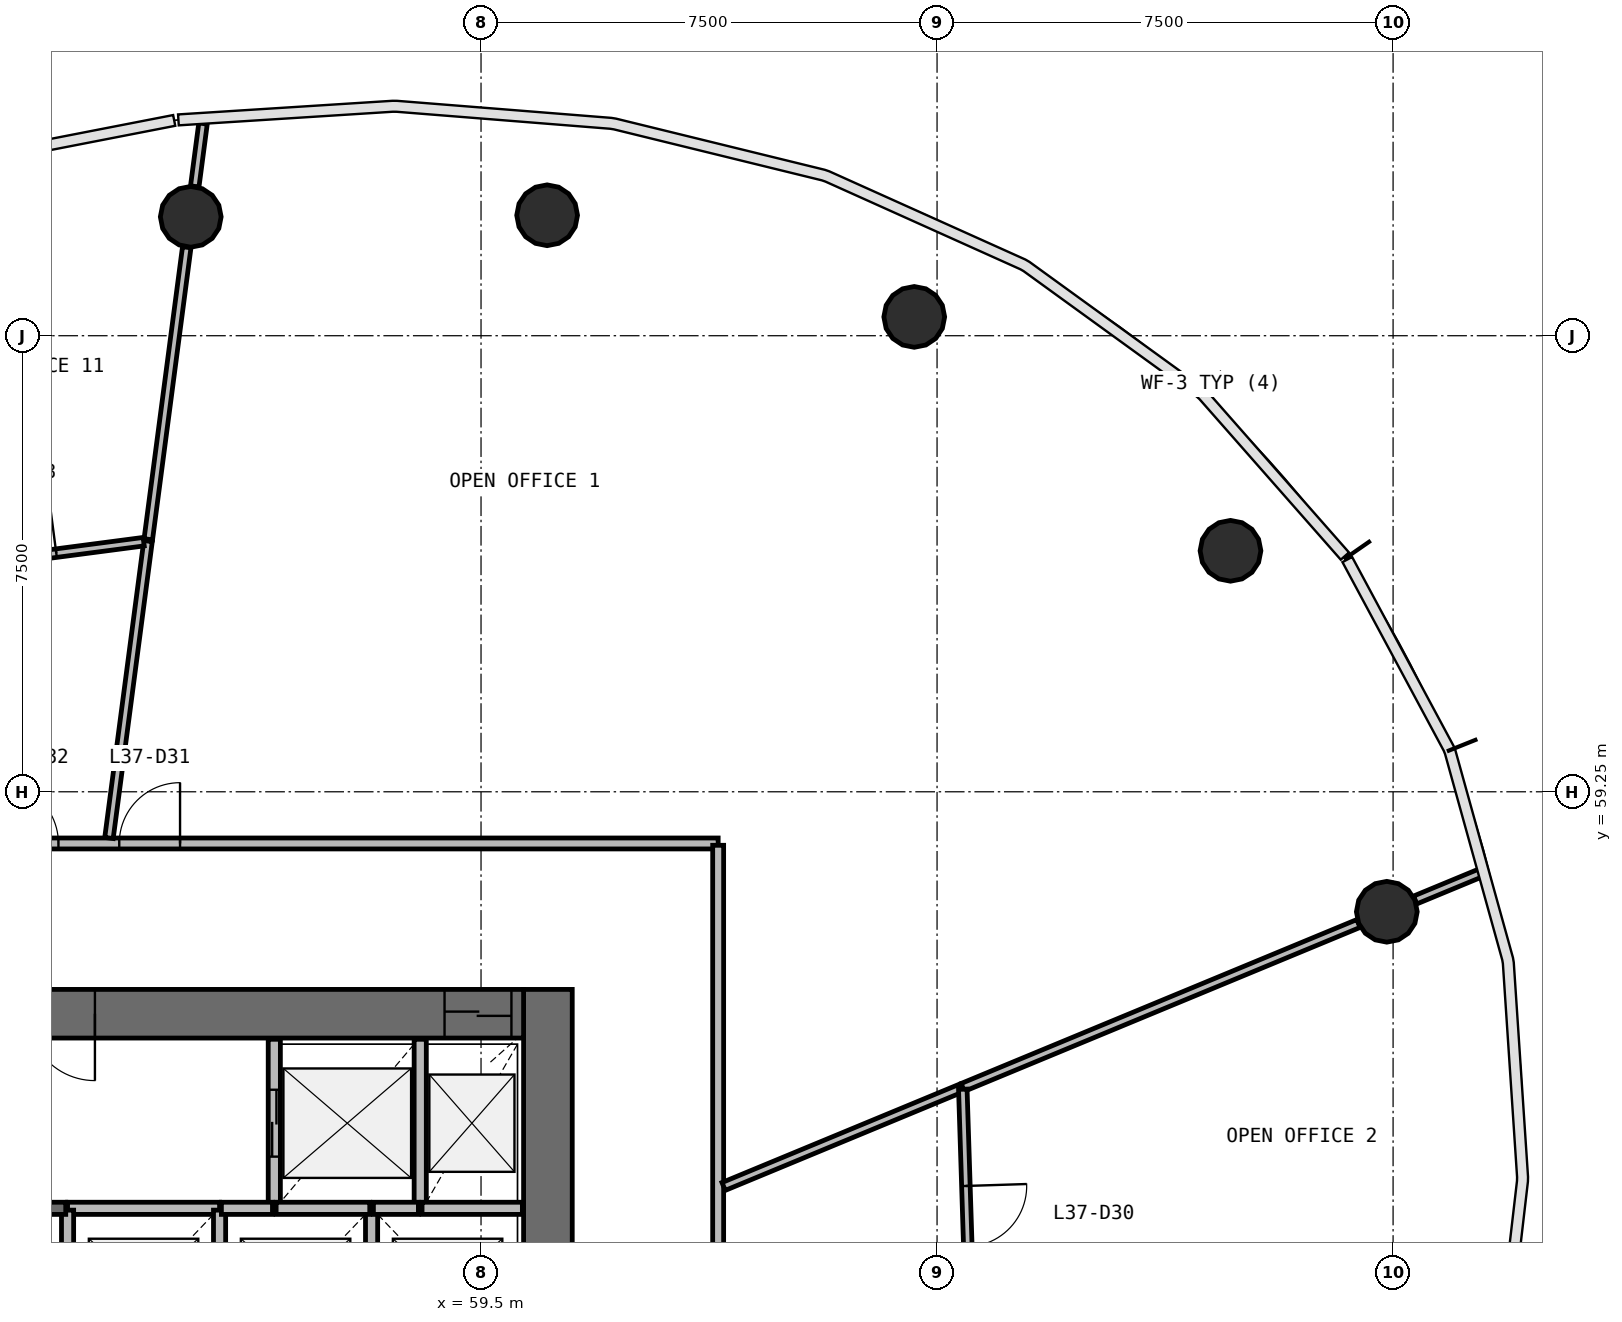
"""IFC4 building model, lengths in metres.
Left out: names, types, materials, properties, quantities, classifications, styles, units other than length and angle.
Written with IfcOpenShell. Run it as: python <this file> out.ifc"""

import sys

from ifc_helpers import new_model, si_unit, direction, frame, frame_2d, origin, origin_2d, place, context, subcontext, project, spatial, rectangle, circle, extrude, source, transform, mapped, element, fill, save


model = new_model("IFC4")
c1 = context("Model", 3, precision=1e-05, world=origin(), true_north=direction((0.0, 1.0)))
c2 = subcontext(c1, "Body", "Model", "MODEL_VIEW")
j1 = project(units=[si_unit("LENGTHUNIT", "METRE"), si_unit("PLANEANGLEUNIT", "RADIAN")], contexts=[c1])
p1 = place(None, origin())
s1 = spatial("IfcSite", under=j1, at=p1, CompositionType="ELEMENT")
p2 = place(p1, origin())
s2 = spatial("IfcBuilding", under=s1, at=p2, CompositionType="ELEMENT")
p3 = place(p2, frame((0.0, 0.0, 156.5)))
s3 = spatial("IfcBuildingStorey", under=s2, at=p3, CompositionType="ELEMENT", Elevation=156.5)
p4 = place(p3, frame((60.6, 40.0, 0.0), z_axis=(0.0, 0.0, 1.0), x_axis=(0.0, 1.0, 0.0)))
e1 = element("IfcWall", 1, at=p4, inside=s3, PredefinedType="SHEAR", context=c2, shape_type="SweptSolid", body=[
    extrude(rectangle(XDim=16.0, YDim=0.8, at=frame_2d((8.0, 0.0))), origin(), (0.0, 0.0, 1.0), 3.9),
])
p5 = place(p4, frame((7.1, 0.0, 0.0)))
e2 = element("IfcOpeningElement", 2, at=p5, cuts=e1, PredefinedType="OPENING", context=c2, shape_type="SweptSolid", body=[
    extrude(rectangle(XDim=1.8, YDim=2.1, at=frame_2d((0.9, 1.05))), frame((0.0, 0.41, 0.0), z_axis=(0.0, -1.0, 0.0), x_axis=(1.0, 0.0, 0.0)), (0.0, 0.0, 1.0), 0.82),
])
p6 = place(p3, frame((60.2, 55.6, 0.0), z_axis=(0.0, 0.0, 1.0), x_axis=(-1.0, 0.0, 0.0)))
e3 = element("IfcWall", 3, at=p6, inside=s3, PredefinedType="SHEAR", context=c2, shape_type="SweptSolid", body=[
    extrude(rectangle(XDim=16.4, YDim=0.8, at=frame_2d((8.2, 0.0))), origin(), (0.0, 0.0, 1.0), 3.9),
])
p7 = place(p6, frame((0.2, 0.0, 0.0)))
e4 = element("IfcOpeningElement", 4, at=p7, cuts=e3, PredefinedType="OPENING", context=c2, shape_type="SweptSolid", body=[
    extrude(rectangle(XDim=1.1, YDim=2.1, at=frame_2d((0.55, 1.05))), frame((0.0, 0.41, 0.0), z_axis=(0.0, -1.0, 0.0), x_axis=(1.0, 0.0, 0.0)), (0.0, 0.0, 1.0), 0.82),
])
p8 = place(p6, frame((10.1, 0.0, 0.0)))
e5 = element("IfcOpeningElement", 5, at=p8, cuts=e3, PredefinedType="OPENING", context=c2, shape_type="SweptSolid", body=[
    extrude(rectangle(XDim=1.2, YDim=2.1, at=frame_2d((0.6, 1.05))), frame((0.0, 0.41, 0.0), z_axis=(0.0, -1.0, 0.0), x_axis=(1.0, 0.0, 0.0)), (0.0, 0.0, 1.0), 0.82),
])
p9 = place(p6, frame((7.05, 0.0, 0.0)))
e6 = element("IfcOpeningElement", 6, at=p9, cuts=e3, PredefinedType="OPENING", context=c2, shape_type="SweptSolid", body=[
    extrude(rectangle(XDim=1.1, YDim=2.1, at=frame_2d((0.55, 1.05))), frame((0.0, 0.41, 0.0), z_axis=(0.0, -1.0, 0.0), x_axis=(1.0, 0.0, 0.0)), (0.0, 0.0, 1.0), 0.82),
])
m1 = source(origin(), c2, "Body", "SweptSolid", [
    extrude(circle(Radius=0.5, at=origin_2d()), origin(), (0.0, 0.0, 1.0), 3.9),
])
for number, where, z_axis, x_axis in (
    (7, (74.397, 57.277, 0.0), (0.0, 0.0, 1.0), (1.0, 0.0, 0.0)),
    (8, (71.826, 63.213, 0.0), (0.0, 0.0, 1.0), (1.0, 0.0, 0.0)),
    (9, (66.625, 67.06, 0.0), (0.0, 0.0, 1.0), (1.0, 0.0, 0.0)),
    (10, (60.587, 68.731, 0.0), (0.0, 0.0, 1.0), (1.0, 0.0, 0.0)),
    (11, (54.726, 68.705, 0.0), (0.0, 0.0, 1.0), (1.0, 0.0, 0.0)),
):
    element("IfcColumn", number, at=place(p3, frame(where, z_axis=z_axis, x_axis=x_axis)), inside=s3, PredefinedType="COLUMN", context=c2, shape_type="MappedRepresentation", body=[
        mapped(m1, transform((0.0, 0.0, 0.0), scale=1.0)),
    ])
p10 = place(p3, frame((56.1, 55.18, 0.0), z_axis=(0.0, 0.0, 1.0), x_axis=(0.0, -1.0, 0.0)))
e12 = element("IfcWall", 12, at=p10, inside=s3, PredefinedType="SOLIDWALL", context=c2, shape_type="SweptSolid", body=[
    extrude(rectangle(XDim=2.78, YDim=0.2, at=frame_2d((1.39, 0.0))), origin(), (0.0, 0.0, 1.0), 3.58),
])
p11 = place(p10, frame((0.83, 0.0, 0.0)))
e13 = element("IfcOpeningElement", 13, at=p11, cuts=e12, PredefinedType="OPENING", context=c2, shape_type="SweptSolid", body=[
    extrude(rectangle(XDim=1.1, YDim=2.1, at=frame_2d((0.55, 1.05))), frame((0.0, 0.11, 0.0), z_axis=(0.0, -1.0, 0.0), x_axis=(1.0, 0.0, 0.0)), (0.0, 0.0, 1.0), 0.22),
])
p12 = place(p3, frame((58.5, 52.4, 0.0), z_axis=(0.0, 0.0, 1.0), x_axis=(0.0, 1.0, 0.0)))
e14 = element("IfcWall", 14, at=p12, inside=s3, PredefinedType="SOLIDWALL", context=c2, shape_type="SweptSolid", body=[
    extrude(rectangle(XDim=2.78, YDim=0.2, at=frame_2d((1.39, 0.0))), origin(), (0.0, 0.0, 1.0), 3.58),
])
p13 = place(p3, frame((55.2, 52.4, 0.0), z_axis=(0.0, 0.0, 1.0), x_axis=(-1.0, 0.0, 0.0)))
e15 = element("IfcWall", 15, at=p13, inside=s3, PredefinedType="SOLIDWALL", context=c2, shape_type="SweptSolid", body=[
    extrude(rectangle(XDim=2.5, YDim=0.2, at=frame_2d((1.25, 0.0))), origin(), (0.0, 0.0, 1.0), 3.58),
])
for number, where, z_axis, x_axis in (
    (16, (52.7, 52.37, 0.0), (0.0, 0.0, 1.0), (0.0, -1.0, 0.0)),
    (17, (55.2, 50.01, 0.0), (0.0, 0.0, 1.0), (0.0, 1.0, 0.0)),
):
    element("IfcWall", number, at=place(p3, frame(where, z_axis=z_axis, x_axis=x_axis)), inside=s3, PredefinedType="SOLIDWALL", context=c2, shape_type="SweptSolid", body=[
        extrude(rectangle(XDim=2.36, YDim=0.2, at=frame_2d((1.18, 0.0))), origin(), (0.0, 0.0, 1.0), 3.58),
    ])
p14 = place(p3, frame((57.7, 50.01, 0.0), z_axis=(0.0, 0.0, 1.0), x_axis=(0.0, 1.0, 0.0)))
e18 = element("IfcWall", 18, at=p14, inside=s3, PredefinedType="SOLIDWALL", context=c2, shape_type="SweptSolid", body=[
    extrude(rectangle(XDim=2.39, YDim=0.2, at=frame_2d((1.195, 0.0))), origin(), (0.0, 0.0, 1.0), 3.58),
])
p15 = place(p3, frame((50.43, 52.4, 0.0), z_axis=(0.0, 0.0, 1.0), x_axis=(1.0, 0.0, 0.0)))
e19 = element("IfcWall", 19, at=p15, inside=s3, PredefinedType="SOLIDWALL", context=c2, shape_type="SweptSolid", body=[
    extrude(rectangle(XDim=2.24, YDim=0.2, at=frame_2d((1.12, 0.0))), origin(), (0.0, 0.0, 1.0), 3.58),
])
p16 = place(p3, frame((60.18, 52.4, 0.0), z_axis=(0.0, 0.0, 1.0), x_axis=(-1.0, 0.0, 0.0)))
e20 = element("IfcWall", 20, at=p16, inside=s3, PredefinedType="SOLIDWALL", context=c2, shape_type="SweptSolid", body=[
    extrude(rectangle(XDim=1.65, YDim=0.2, at=frame_2d((0.825, 0.0))), origin(), (0.0, 0.0, 1.0), 3.58),
])
p17 = place(p3, frame((57.67, 52.4, 0.0), z_axis=(0.0, 0.0, 1.0), x_axis=(-1.0, 0.0, 0.0)))
e21 = element("IfcWall", 21, at=p17, inside=s3, PredefinedType="SOLIDWALL", context=c2, shape_type="SweptSolid", body=[
    extrude(rectangle(XDim=1.54, YDim=0.2, at=frame_2d((0.77, 0.0))), origin(), (0.0, 0.0, 1.0), 3.58),
])
p18 = place(p3, frame((56.07, 52.4, 0.0), z_axis=(0.0, 0.0, 1.0), x_axis=(-1.0, 0.0, 0.0)))
e22 = element("IfcWall", 22, at=p18, inside=s3, PredefinedType="SOLIDWALL", context=c2, shape_type="SweptSolid", body=[
    extrude(rectangle(XDim=0.84, YDim=0.2, at=frame_2d((0.42, 0.0))), origin(), (0.0, 0.0, 1.0), 3.58),
])
p19 = place(p3, frame((58.47, 52.4, 0.0), z_axis=(0.0, 0.0, 1.0), x_axis=(-1.0, 0.0, 0.0)))
e23 = element("IfcWall", 23, at=p19, inside=s3, PredefinedType="SOLIDWALL", context=c2, shape_type="SweptSolid", body=[
    extrude(rectangle(XDim=0.74, YDim=0.2, at=frame_2d((0.37, 0.0))), origin(), (0.0, 0.0, 1.0), 3.58),
])
p20 = place(p3, frame((40.6, 58.4, 0.0), z_axis=(0.0, 0.0, 1.0), x_axis=(1.0, 0.0, 0.0)))
e24 = element("IfcWall", 24, at=p20, inside=s3, PredefinedType="PARTITIONING", context=c2, shape_type="SweptSolid", body=[
    extrude(rectangle(XDim=22.8, YDim=0.18, at=frame_2d((11.4, 0.0))), origin(), (0.0, 0.0, 1.0), 2.88),
])
p21 = place(p20, frame((12.95, 0.0, 0.0)))
e25 = element("IfcOpeningElement", 25, at=p21, cuts=e24, PredefinedType="OPENING", context=c2, shape_type="SweptSolid", body=[
    extrude(rectangle(XDim=1.0, YDim=2.1, at=frame_2d((0.5, 1.05))), frame((0.0, 0.1, 0.0), z_axis=(0.0, -1.0, 0.0), x_axis=(1.0, 0.0, 0.0)), (0.0, 0.0, 1.0), 0.2),
])
p22 = place(p20, frame((10.95, 0.0, 0.0)))
e26 = element("IfcOpeningElement", 26, at=p22, cuts=e24, PredefinedType="OPENING", context=c2, shape_type="SweptSolid", body=[
    extrude(rectangle(XDim=1.0, YDim=2.1, at=frame_2d((0.5, 1.05))), frame((0.0, 0.1, 0.0), z_axis=(0.0, -1.0, 0.0), x_axis=(1.0, 0.0, 0.0)), (0.0, 0.0, 1.0), 0.2),
])
p23 = place(p3, frame((63.4, 58.37, 0.0), z_axis=(0.0, 0.0, 1.0), x_axis=(0.0, -1.0, 0.0)))
e27 = element("IfcWall", 27, at=p23, inside=s3, PredefinedType="PARTITIONING", context=c2, shape_type="SweptSolid", body=[
    extrude(rectangle(XDim=20.74, YDim=0.18, at=frame_2d((10.37, 0.0))), origin(), (0.0, 0.0, 1.0), 2.88),
])
p24 = place(p23, frame((15.49, 0.0, 0.0)))
e28 = element("IfcOpeningElement", 28, at=p24, cuts=e27, PredefinedType="OPENING", context=c2, shape_type="SweptSolid", body=[
    extrude(rectangle(XDim=1.0, YDim=2.1, at=frame_2d((0.5, 1.05))), frame((0.0, 0.1, 0.0), z_axis=(0.0, -1.0, 0.0), x_axis=(1.0, 0.0, 0.0)), (0.0, 0.0, 1.0), 0.2),
])
p25 = place(p23, frame((9.89, 0.0, 0.0)))
e29 = element("IfcOpeningElement", 29, at=p25, cuts=e27, PredefinedType="OPENING", context=c2, shape_type="SweptSolid", body=[
    extrude(rectangle(XDim=1.0, YDim=2.1, at=frame_2d((0.5, 1.05))), frame((0.0, 0.1, 0.0), z_axis=(0.0, -1.0, 0.0), x_axis=(1.0, 0.0, 0.0)), (0.0, 0.0, 1.0), 0.2),
])
p26 = place(p3, frame((67.423, 54.388, 0.0), z_axis=(0.0, 0.0, 1.0), x_axis=(0.923877847589, 0.382687500102, 0.0)))
e30 = element("IfcWall", 30, at=p26, inside=s3, PredefinedType="PARTITIONING", context=c2, shape_type="SweptSolid", body=[
    extrude(rectangle(XDim=7.044, YDim=0.14, at=frame_2d((3.522, 0.0))), origin(), (0.0, 0.0, 1.0), 2.88),
])
p27 = place(p3, frame((53.381, 58.49, 0.0), z_axis=(0.0, 0.0, 1.0), x_axis=(0.130523758186, 0.991445181817, 0.0)))
e31 = element("IfcWall", 31, at=p27, inside=s3, PredefinedType="PARTITIONING", context=c2, shape_type="SweptSolid", body=[
    extrude(rectangle(XDim=4.925, YDim=0.14, at=frame_2d((2.462, 0.0))), origin(), (0.0, 0.0, 1.0), 2.88),
])
p28 = place(p3, frame((54.028, 63.402, 0.0), z_axis=(0.0, 0.0, 1.0), x_axis=(0.130532734851, 0.991443999998, 0.0)))
e32 = element("IfcWall", 32, at=p28, inside=s3, PredefinedType="PARTITIONING", context=c2, shape_type="SweptSolid", body=[
    extrude(rectangle(XDim=4.844, YDim=0.14, at=frame_2d((2.422, 0.0))), origin(), (0.0, 0.0, 1.0), 2.88),
])
p29 = place(p3, frame((63.49, 52.759, 0.0), z_axis=(0.0, 0.0, 1.0), x_axis=(0.923878137975, 0.382686799055, 0.0)))
e33 = element("IfcWall", 33, at=p29, inside=s3, PredefinedType="PARTITIONING", context=c2, shape_type="SweptSolid", body=[
    extrude(rectangle(XDim=4.227, YDim=0.14, at=frame_2d((2.113, 0.0))), origin(), (0.0, 0.0, 1.0), 2.88),
])
p30 = place(p3, frame((67.424, 54.358, 0.0), z_axis=(0.0, 0.0, 1.0), x_axis=(0.031887030208, -0.999491479356, 0.0)))
e34 = element("IfcWall", 34, at=p30, inside=s3, PredefinedType="PARTITIONING", context=c2, shape_type="SweptSolid", body=[
    extrude(rectangle(XDim=4.242, YDim=0.14, at=frame_2d((2.121, 0.0))), origin(), (0.0, 0.0, 1.0), 2.88),
])
p31 = place(p30, frame((1.592, 0.0, 0.0)))
e35 = element("IfcOpeningElement", 35, at=p31, cuts=e34, PredefinedType="OPENING", context=c2, shape_type="SweptSolid", body=[
    extrude(rectangle(XDim=1.0, YDim=2.1, at=frame_2d((0.5, 1.05))), frame((0.0, 0.08, 0.0), z_axis=(0.0, -1.0, 0.0), x_axis=(1.0, 0.0, 0.0)), (0.0, 0.0, 1.0), 0.16),
])
p32 = place(p3, frame((50.075, 62.854, 0.0), z_axis=(0.0, 0.0, 1.0), x_axis=(0.991491442794, 0.130171882012, 0.0)))
e36 = element("IfcWall", 36, at=p32, inside=s3, PredefinedType="PARTITIONING", context=c2, shape_type="SweptSolid", body=[
    extrude(rectangle(XDim=3.91, YDim=0.14, at=frame_2d((1.955, 0.0))), origin(), (0.0, 0.0, 1.0), 2.88),
])
p33 = place(p32, frame((1.461, 0.0, 0.0)))
e37 = element("IfcOpeningElement", 37, at=p33, cuts=e36, PredefinedType="OPENING", context=c2, shape_type="SweptSolid", body=[
    extrude(rectangle(XDim=1.0, YDim=2.1, at=frame_2d((0.5, 1.05))), frame((0.0, 0.08, 0.0), z_axis=(0.0, -1.0, 0.0), x_axis=(1.0, 0.0, 0.0)), (0.0, 0.0, 1.0), 0.16),
])
p34 = place(p3, frame((74.863, 57.47, 0.0), z_axis=(0.0, 0.0, 1.0), x_axis=(0.923882723383, 0.382675728829, 0.0)))
e38 = element("IfcWall", 38, at=p34, inside=s3, PredefinedType="PARTITIONING", context=c2, shape_type="SweptSolid", body=[
    extrude(rectangle(XDim=1.198, YDim=0.14, at=frame_2d((0.599, 0.0))), origin(), (0.0, 0.0, 1.0), 2.88),
])
p35 = place(p3, frame((54.792, 69.205, 0.0), z_axis=(0.0, 0.0, 1.0), x_axis=(0.130569518357, 0.991439156417, 0.0)))
e39 = element("IfcWall", 39, at=p35, inside=s3, PredefinedType="PARTITIONING", context=c2, shape_type="SweptSolid", body=[
    extrude(rectangle(XDim=1.043, YDim=0.14, at=frame_2d((0.522, 0.0))), origin(), (0.0, 0.0, 1.0), 2.88),
])
m2 = source(origin(), c2, "Body", "SweptSolid", [
    extrude(rectangle(XDim=1.1, YDim=2.1, at=frame_2d((0.55, 1.05))), frame((0.0, 0.025, 0.0), z_axis=(0.0, -1.0, 0.0), x_axis=(1.0, 0.0, 0.0)), (0.0, 0.0, 1.0), 0.05),
])
p36 = place(p11, origin())
e40 = element("IfcDoor", 40, at=p36, inside=s3, OperationType="DOUBLE_DOOR_SLIDING", PredefinedType="USERDEFINED", context=c2, shape_type="MappedRepresentation", body=[
    mapped(m2, transform((0.0, 0.0, 0.0), scale=1.0)),
])
fill(e13, e40)
p37 = place(p7, origin())
e41 = element("IfcDoor", 41, at=p37, inside=s3, OperationType="DOUBLE_DOOR_SLIDING", PredefinedType="USERDEFINED", context=c2, shape_type="MappedRepresentation", body=[
    mapped(m2, transform((0.0, 0.0, 0.0), scale=1.0)),
])
fill(e4, e41)
m3 = source(origin(), c2, "Body", "SweptSolid", [
    extrude(rectangle(XDim=1.1, YDim=2.1, at=frame_2d((0.55, 1.05))), frame((0.0, 0.025, 0.0), z_axis=(0.0, -1.0, 0.0), x_axis=(1.0, 0.0, 0.0)), (0.0, 0.0, 1.0), 0.05),
])
p38 = place(p9, origin())
e42 = element("IfcDoor", 42, at=p38, inside=s3, OperationType="SINGLE_SWING_LEFT", PredefinedType="DOOR", context=c2, shape_type="MappedRepresentation", body=[
    mapped(m3, transform((0.0, 0.0, 0.0), scale=1.0)),
])
fill(e6, e42)
m4 = source(origin(), c2, "Body", "SweptSolid", [
    extrude(rectangle(XDim=1.0, YDim=2.1, at=frame_2d((0.5, 1.05))), frame((0.0, 0.025, 0.0), z_axis=(0.0, -1.0, 0.0), x_axis=(1.0, 0.0, 0.0)), (0.0, 0.0, 1.0), 0.05),
])
p39 = place(p31, origin())
e43 = element("IfcDoor", 43, at=p39, inside=s3, OperationType="SINGLE_SWING_LEFT", PredefinedType="DOOR", context=c2, shape_type="MappedRepresentation", body=[
    mapped(m4, transform((0.0, 0.0, 0.0), scale=1.0)),
])
fill(e35, e43)
p40 = place(p21, origin())
e44 = element("IfcDoor", 44, at=p40, inside=s3, OperationType="SINGLE_SWING_RIGHT", PredefinedType="DOOR", context=c2, shape_type="MappedRepresentation", body=[
    mapped(m4, transform((0.0, 0.0, 0.0), scale=1.0)),
])
fill(e25, e44)
p41 = place(p22, origin())
e45 = element("IfcDoor", 45, at=p41, inside=s3, OperationType="SINGLE_SWING_LEFT", PredefinedType="DOOR", context=c2, shape_type="MappedRepresentation", body=[
    mapped(m4, transform((0.0, 0.0, 0.0), scale=1.0)),
])
fill(e26, e45)
p42 = place(p33, origin())
e46 = element("IfcDoor", 46, at=p42, inside=s3, OperationType="SINGLE_SWING_RIGHT", PredefinedType="DOOR", context=c2, shape_type="MappedRepresentation", body=[
    mapped(m4, transform((0.0, 0.0, 0.0), scale=1.0)),
])
fill(e37, e46)
save(model, sys.argv[1])
